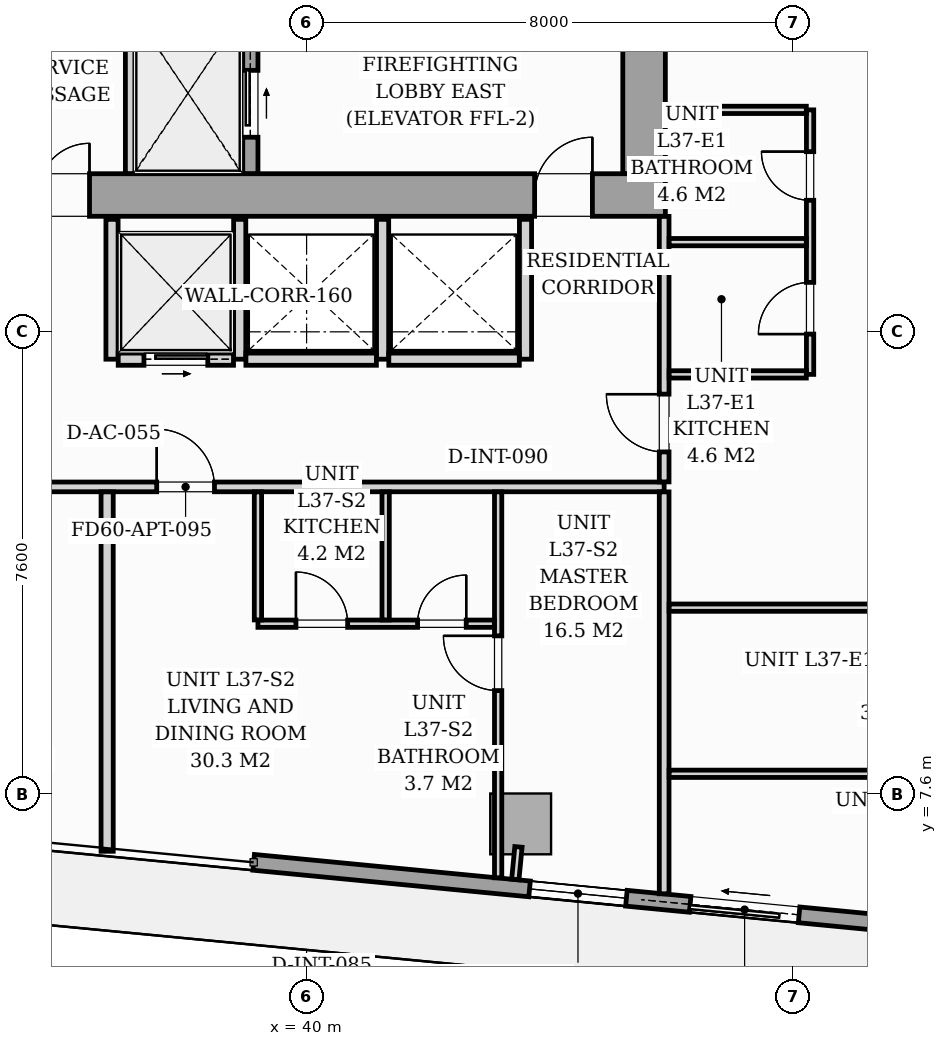
"""IFC4 building model, lengths in metres.
Left out: names, types, materials, properties, quantities, classifications, styles, units other than length and angle.
Written with IfcOpenShell. Run it as: python <this file> out.ifc"""

import sys

from ifc_helpers import new_model, si_unit, direction, frame, frame_2d, origin, origin_2d, place, context, subcontext, project, spatial, rectangle, i_section, extrude, source, transform, mapped, element, fill, save


model = new_model("IFC4")
c1 = context("Model", 3, precision=1e-05, world=origin(), true_north=direction((0.0, 1.0)))
c2 = subcontext(c1, "Body", "Model", "MODEL_VIEW")
j1 = project(units=[si_unit("LENGTHUNIT", "METRE"), si_unit("PLANEANGLEUNIT", "RADIAN")], contexts=[c1])
p1 = place(None, origin())
s1 = spatial("IfcSite", under=j1, at=p1, CompositionType="ELEMENT")
p2 = place(p1, origin())
s2 = spatial("IfcBuilding", under=s1, at=p2, CompositionType="ELEMENT")
p3 = place(p2, frame((0.0, 0.0, 131.0)))
s3 = spatial("IfcBuildingStorey", under=s2, at=p3, CompositionType="ELEMENT", Elevation=131.0)
m1 = source(origin(), c2, "Body", "SweptSolid", [
    extrude(i_section(OverallWidth=0.421, OverallDepth=0.465, WebThickness=0.045, FlangeThickness=0.073, FilletRadius=0.018, at=origin_2d()), origin(), (0.0, 0.0, 1.0), 3.196),
])
for number, where, z_axis, x_axis in (
    (1, (38.88, 17.4, 0.002), (0.0, 0.0, 1.0), (1.0, 0.0, 0.0)),
    (2, (45.6, 17.4, 0.002), (0.0, 0.0, 1.0), (1.0, 0.0, 0.0)),
):
    element("IfcColumn", number, at=place(p3, frame(where, z_axis=z_axis, x_axis=x_axis)), inside=s3, PredefinedType="PILASTER", context=c2, shape_type="MappedRepresentation", body=[
        mapped(m1, transform((0.0, 0.0, 0.0), scale=1.0)),
    ])
m2 = source(origin(), c2, "Body", "SweptSolid", [
    extrude(rectangle(XDim=1.0, YDim=1.0, at=origin_2d()), origin(), (0.0, 0.0, 1.0), 3.196),
])
p4 = place(p3, frame((43.521, 7.108, 0.002), z_axis=(0.0, 0.0, 1.0), x_axis=(0.995396198367, -0.09584575252, 0.0)))
e3 = element("IfcColumn", 3, at=p4, inside=s3, PredefinedType="COLUMN", context=c2, shape_type="MappedRepresentation", body=[
    mapped(m2, transform((0.0, 0.0, 0.0), scale=1.0)),
])
p5 = place(p3, frame((56.061, 4.845, 0.0), z_axis=(0.0, 0.0, 1.0), x_axis=(-0.995395976631, 0.095848055311, 0.0)))
e4 = element("IfcWall", 4, at=p5, inside=s3, PredefinedType="STANDARD", context=c2, shape_type="SweptSolid", body=[
    extrude(rectangle(XDim=17.01, YDim=0.26, at=frame_2d((8.505, 0.0))), origin(), (0.0, 0.0, 1.0), 2.94),
])
p6 = place(p5, frame((7.999, 0.0, 0.0)))
e5 = element("IfcOpeningElement", 5, at=p6, cuts=e4, PredefinedType="OPENING", context=c2, shape_type="SweptSolid", body=[
    extrude(rectangle(XDim=1.8, YDim=2.06, at=frame_2d((0.9, 1.03))), frame((0.0, 0.14, 0.0), z_axis=(0.0, -1.0, 0.0), x_axis=(1.0, 0.0, 0.0)), (0.0, 0.0, 1.0), 0.28),
])
p7 = place(p5, frame((2.05, 0.0, 0.65)))
e6 = element("IfcOpeningElement", 6, at=p7, cuts=e4, PredefinedType="OPENING", context=c2, shape_type="SweptSolid", body=[
    extrude(rectangle(XDim=1.6, YDim=1.5, at=frame_2d((0.8, 0.75))), frame((0.0, 0.14, 0.0), z_axis=(0.0, -1.0, 0.0), x_axis=(1.0, 0.0, 0.0)), (0.0, 0.0, 1.0), 0.28),
])
p8 = place(p5, frame((10.852, 0.0, 0.75)))
e7 = element("IfcOpeningElement", 7, at=p8, cuts=e4, PredefinedType="OPENING", context=c2, shape_type="SweptSolid", body=[
    extrude(rectangle(XDim=1.6, YDim=1.5, at=frame_2d((0.8, 0.75))), frame((0.0, 0.14, 0.0), z_axis=(0.0, -1.0, 0.0), x_axis=(1.0, 0.0, 0.0)), (0.0, 0.0, 1.0), 0.28),
])
p9 = place(p3, frame((26.1, 17.45, 0.0), z_axis=(0.0, 0.0, 1.0), x_axis=(1.0, 0.0, 0.0)))
e8 = element("IfcWall", 8, at=p9, inside=s3, PredefinedType="SHEAR", context=c2, shape_type="SweptSolid", body=[
    extrude(rectangle(XDim=19.8, YDim=0.7, at=frame_2d((9.9, 0.0))), origin(), (0.0, 0.0, 1.0), 3.2),
])
p10 = place(p9, frame((1.05, 0.0, 0.0)))
e9 = element("IfcOpeningElement", 9, at=p10, cuts=e8, PredefinedType="OPENING", context=c2, shape_type="SweptSolid", body=[
    extrude(rectangle(XDim=0.95, YDim=2.06, at=frame_2d((0.475, 1.03))), frame((0.0, 0.36, 0.0), z_axis=(0.0, -1.0, 0.0), x_axis=(1.0, 0.0, 0.0)), (0.0, 0.0, 1.0), 0.72),
])
p11 = place(p9, frame((9.48, 0.0, 0.0)))
e10 = element("IfcOpeningElement", 10, at=p11, cuts=e8, PredefinedType="OPENING", context=c2, shape_type="SweptSolid", body=[
    extrude(rectangle(XDim=0.85, YDim=2.0, at=frame_2d((0.425, 1.0))), frame((0.0, 0.36, 0.0), z_axis=(0.0, -1.0, 0.0), x_axis=(1.0, 0.0, 0.0)), (0.0, 0.0, 1.0), 0.72),
])
p12 = place(p9, frame((17.65, 0.0, 0.0)))
e11 = element("IfcOpeningElement", 11, at=p12, cuts=e8, PredefinedType="OPENING", context=c2, shape_type="SweptSolid", body=[
    extrude(rectangle(XDim=0.95, YDim=2.06, at=frame_2d((0.475, 1.03))), frame((0.0, 0.36, 0.0), z_axis=(0.0, -1.0, 0.0), x_axis=(1.0, 0.0, 0.0)), (0.0, 0.0, 1.0), 0.72),
])
p13 = place(p3, frame((45.55, 17.802, 0.0), z_axis=(0.0, 0.0, 1.0), x_axis=(0.0, 1.0, 0.0)))
e12 = element("IfcWall", 12, at=p13, inside=s3, PredefinedType="SHEAR", context=c2, shape_type="SweptSolid", body=[
    extrude(rectangle(XDim=5.796, YDim=0.7, at=frame_2d((2.898, 0.0))), origin(), (0.0, 0.0, 1.0), 3.2),
])
p14 = place(p3, frame((37.1, 17.802, 0.0), z_axis=(0.0, 0.0, 1.0), x_axis=(0.0, 1.0, 0.0)))
e13 = element("IfcWall", 13, at=p14, inside=s3, PredefinedType="PARTITIONING", context=c2, shape_type="SweptSolid", body=[
    extrude(rectangle(XDim=2.646, YDim=0.16, at=frame_2d((1.323, 0.0))), origin(), (0.0, 0.0, 1.0), 2.94),
])
p15 = place(p3, frame((39.075, 17.802, 0.0), z_axis=(0.0, 0.0, 1.0), x_axis=(0.0, 1.0, 0.0)))
e14 = element("IfcWall", 14, at=p15, inside=s3, PredefinedType="SOLIDWALL", context=c2, shape_type="SweptSolid", body=[
    extrude(rectangle(XDim=2.646, YDim=0.25, at=frame_2d((1.323, 0.0))), origin(), (0.0, 0.0, 1.0), 3.2),
])
p16 = place(p15, frame((0.598, 0.0, 0.0)))
e15 = element("IfcOpeningElement", 15, at=p16, cuts=e14, PredefinedType="OPENING", context=c2, shape_type="SweptSolid", body=[
    extrude(rectangle(XDim=1.1, YDim=2.08, at=frame_2d((0.55, 1.04))), frame((0.0, 0.135, 0.0), z_axis=(0.0, -1.0, 0.0), x_axis=(1.0, 0.0, 0.0)), (0.0, 0.0, 1.0), 0.27),
])
for number, where, z_axis, x_axis in (
    (16, (36.8, 14.75, 0.0), (0.0, 0.0, 1.0), (0.0, 1.0, 0.0)),
    (17, (38.9, 14.75, 0.0), (0.0, 0.0, 1.0), (0.0, 1.0, 0.0)),
):
    element("IfcWall", number, at=place(p3, frame(where, z_axis=z_axis, x_axis=x_axis)), inside=s3, PredefinedType="PARTITIONING", context=c2, shape_type="SweptSolid", body=[
        extrude(rectangle(XDim=2.3, YDim=0.2, at=frame_2d((1.15, 0.0))), origin(), (0.0, 0.0, 1.0), 2.94),
    ])
p17 = place(p3, frame((36.902, 14.75, 0.0), z_axis=(0.0, 0.0, 1.0), x_axis=(1.0, 0.0, 0.0)))
e18 = element("IfcWall", 18, at=p17, inside=s3, PredefinedType="PARTITIONING", context=c2, shape_type="SweptSolid", body=[
    extrude(rectangle(XDim=1.896, YDim=0.2, at=frame_2d((0.948, 0.0))), origin(), (0.0, 0.0, 1.0), 2.94),
])
p18 = place(p17, frame((0.423, 0.0, 0.0)))
e19 = element("IfcOpeningElement", 19, at=p18, cuts=e18, PredefinedType="OPENING", context=c2, shape_type="SweptSolid", body=[
    extrude(rectangle(XDim=1.05, YDim=2.08, at=frame_2d((0.525, 1.04))), frame((0.0, 0.11, 0.0), z_axis=(0.0, -1.0, 0.0), x_axis=(1.0, 0.0, 0.0)), (0.0, 0.0, 1.0), 0.22),
])
for number, where, z_axis, x_axis in (
    (20, (41.25, 14.75, 0.0), (0.0, 0.0, 1.0), (0.0, 1.0, 0.0)),
    (21, (43.6, 14.75, 0.0), (0.0, 0.0, 1.0), (0.0, 1.0, 0.0)),
):
    element("IfcWall", number, at=place(p3, frame(where, z_axis=z_axis, x_axis=x_axis)), inside=s3, PredefinedType="PARTITIONING", context=c2, shape_type="SweptSolid", body=[
        extrude(rectangle(XDim=2.3, YDim=0.2, at=frame_2d((1.15, 0.0))), origin(), (0.0, 0.0, 1.0), 2.94),
    ])
for number, where, z_axis, x_axis in (
    (22, (39.002, 14.75, 0.0), (0.0, 0.0, 1.0), (1.0, 0.0, 0.0)),
    (23, (41.352, 14.75, 0.0), (0.0, 0.0, 1.0), (1.0, 0.0, 0.0)),
):
    element("IfcWall", number, at=place(p3, frame(where, z_axis=z_axis, x_axis=x_axis)), inside=s3, PredefinedType="PARTITIONING", context=c2, shape_type="SweptSolid", body=[
        extrude(rectangle(XDim=2.146, YDim=0.2, at=frame_2d((1.073, 0.0))), origin(), (0.0, 0.0, 1.0), 2.94),
    ])
p19 = place(p3, frame((22.05, 12.65, 0.0), z_axis=(0.0, 0.0, 1.0), x_axis=(1.0, 0.0, 0.0)))
e24 = element("IfcWall", 24, at=p19, inside=s3, PredefinedType="PARTITIONING", context=c2, shape_type="SweptSolid", body=[
    extrude(rectangle(XDim=23.83, YDim=0.16, at=frame_2d((11.915, 0.0))), origin(), (0.0, 0.0, 1.0), 2.94),
])
p20 = place(p19, frame((3.0, 0.0, 0.0)))
e25 = element("IfcOpeningElement", 25, at=p20, cuts=e24, PredefinedType="OPENING", context=c2, shape_type="SweptSolid", body=[
    extrude(rectangle(XDim=0.95, YDim=2.06, at=frame_2d((0.475, 1.03))), frame((0.0, 0.09, 0.0), z_axis=(0.0, -1.0, 0.0), x_axis=(1.0, 0.0, 0.0)), (0.0, 0.0, 1.0), 0.18),
])
p21 = place(p19, frame((15.485, 0.0, 0.0)))
e26 = element("IfcOpeningElement", 26, at=p21, cuts=e24, PredefinedType="OPENING", context=c2, shape_type="SweptSolid", body=[
    extrude(rectangle(XDim=0.95, YDim=2.06, at=frame_2d((0.475, 1.03))), frame((0.0, 0.09, 0.0), z_axis=(0.0, -1.0, 0.0), x_axis=(1.0, 0.0, 0.0)), (0.0, 0.0, 1.0), 0.18),
])
p22 = place(p3, frame((45.88, 5.958, 0.0), z_axis=(0.0, 0.0, 1.0), x_axis=(0.0, 1.0, 0.0)))
e27 = element("IfcWall", 27, at=p22, inside=s3, PredefinedType="PARTITIONING", context=c2, shape_type="SweptSolid", body=[
    extrude(rectangle(XDim=6.61, YDim=0.16, at=frame_2d((3.305, 0.0))), origin(), (0.0, 0.0, 1.0), 2.94),
])
p23 = place(p3, frame((45.88, 12.732, 0.0), z_axis=(0.0, 0.0, 1.0), x_axis=(0.0, 1.0, 0.0)))
e28 = element("IfcWall", 28, at=p23, inside=s3, PredefinedType="PARTITIONING", context=c2, shape_type="SweptSolid", body=[
    extrude(rectangle(XDim=4.366, YDim=0.16, at=frame_2d((2.183, 0.0))), origin(), (0.0, 0.0, 1.0), 2.94),
])
p24 = place(p23, frame((0.493, 0.0, 0.0)))
e29 = element("IfcOpeningElement", 29, at=p24, cuts=e28, PredefinedType="OPENING", context=c2, shape_type="SweptSolid", body=[
    extrude(rectangle(XDim=0.95, YDim=2.06, at=frame_2d((0.475, 1.03))), frame((0.0, 0.09, 0.0), z_axis=(0.0, -1.0, 0.0), x_axis=(1.0, 0.0, 0.0)), (0.0, 0.0, 1.0), 0.18),
])
p25 = place(p3, frame((36.72, 6.658, 0.0), z_axis=(0.0, 0.0, 1.0), x_axis=(0.0, 1.0, 0.0)))
e30 = element("IfcWall", 30, at=p25, inside=s3, PredefinedType="PARTITIONING", context=c2, shape_type="SweptSolid", body=[
    extrude(rectangle(XDim=5.91, YDim=0.2, at=frame_2d((2.955, 0.0))), origin(), (0.0, 0.0, 1.0), 2.94),
])
p26 = place(p3, frame((43.15, 6.221, 0.0), z_axis=(0.0, 0.0, 1.0), x_axis=(0.0, 1.0, 0.0)))
e31 = element("IfcWall", 31, at=p26, inside=s3, PredefinedType="PARTITIONING", context=c2, shape_type="SweptSolid", body=[
    extrude(rectangle(XDim=6.347, YDim=0.12, at=frame_2d((3.173, 0.0))), origin(), (0.0, 0.0, 1.0), 2.94),
])
p27 = place(p26, frame((3.079, 0.0, 0.0)))
e32 = element("IfcOpeningElement", 32, at=p27, cuts=e31, PredefinedType="OPENING", context=c2, shape_type="SweptSolid", body=[
    extrude(rectangle(XDim=0.9, YDim=2.05, at=frame_2d((0.45, 1.025))), frame((0.0, 0.07, 0.0), z_axis=(0.0, -1.0, 0.0), x_axis=(1.0, 0.0, 0.0)), (0.0, 0.0, 1.0), 0.14),
])
p28 = place(p3, frame((39.2, 10.4, 0.0), z_axis=(0.0, 0.0, 1.0), x_axis=(1.0, 0.0, 0.0)))
e33 = element("IfcWall", 33, at=p28, inside=s3, PredefinedType="PARTITIONING", context=c2, shape_type="SweptSolid", body=[
    extrude(rectangle(XDim=3.888, YDim=0.12, at=frame_2d((1.944, 0.0))), origin(), (0.0, 0.0, 1.0), 2.94),
])
p29 = place(p28, frame((0.625, 0.0, 0.0)))
e34 = element("IfcOpeningElement", 34, at=p29, cuts=e33, PredefinedType="OPENING", context=c2, shape_type="SweptSolid", body=[
    extrude(rectangle(XDim=0.85, YDim=2.05, at=frame_2d((0.425, 1.025))), frame((0.0, 0.07, 0.0), z_axis=(0.0, -1.0, 0.0), x_axis=(1.0, 0.0, 0.0)), (0.0, 0.0, 1.0), 0.14),
])
p30 = place(p28, frame((2.625, 0.0, 0.0)))
e35 = element("IfcOpeningElement", 35, at=p30, cuts=e33, PredefinedType="OPENING", context=c2, shape_type="SweptSolid", body=[
    extrude(rectangle(XDim=0.8, YDim=2.02, at=frame_2d((0.4, 1.01))), frame((0.0, 0.07, 0.0), z_axis=(0.0, -1.0, 0.0), x_axis=(1.0, 0.0, 0.0)), (0.0, 0.0, 1.0), 0.14),
])
for number, where, z_axis, x_axis in (
    (36, (41.3, 10.462, 0.0), (0.0, 0.0, 1.0), (0.0, 1.0, 0.0)),
    (37, (39.2, 10.462, 0.0), (0.0, 0.0, 1.0), (0.0, 1.0, 0.0)),
):
    element("IfcWall", number, at=place(p3, frame(where, z_axis=z_axis, x_axis=x_axis)), inside=s3, PredefinedType="PARTITIONING", context=c2, shape_type="SweptSolid", body=[
        extrude(rectangle(XDim=2.106, YDim=0.12, at=frame_2d((1.053, 0.0))), origin(), (0.0, 0.0, 1.0), 2.94),
    ])
p31 = place(p3, frame((48.28, 14.5, 0.0), z_axis=(0.0, 0.0, 1.0), x_axis=(0.0, 1.0, 0.0)))
e38 = element("IfcWall", 38, at=p31, inside=s3, PredefinedType="PARTITIONING", context=c2, shape_type="SweptSolid", body=[
    extrude(rectangle(XDim=4.35, YDim=0.12, at=frame_2d((2.175, 0.0))), origin(), (0.0, 0.0, 1.0), 2.94),
])
p32 = place(p31, frame((0.663, 0.0, 0.0)))
e39 = element("IfcOpeningElement", 39, at=p32, cuts=e38, PredefinedType="OPENING", context=c2, shape_type="SweptSolid", body=[
    extrude(rectangle(XDim=0.85, YDim=2.05, at=frame_2d((0.425, 1.025))), frame((0.0, 0.07, 0.0), z_axis=(0.0, -1.0, 0.0), x_axis=(1.0, 0.0, 0.0)), (0.0, 0.0, 1.0), 0.14),
])
p33 = place(p31, frame((2.863, 0.0, 0.0)))
e40 = element("IfcOpeningElement", 40, at=p33, cuts=e38, PredefinedType="OPENING", context=c2, shape_type="SweptSolid", body=[
    extrude(rectangle(XDim=0.8, YDim=2.02, at=frame_2d((0.4, 1.01))), frame((0.0, 0.07, 0.0), z_axis=(0.0, -1.0, 0.0), x_axis=(1.0, 0.0, 0.0)), (0.0, 0.0, 1.0), 0.14),
])
p34 = place(p3, frame((45.962, 16.675, 0.0), z_axis=(0.0, 0.0, 1.0), x_axis=(1.0, 0.0, 0.0)))
e41 = element("IfcWall", 41, at=p34, inside=s3, PredefinedType="PARTITIONING", context=c2, shape_type="SweptSolid", body=[
    extrude(rectangle(XDim=2.256, YDim=0.12, at=frame_2d((1.128, 0.0))), origin(), (0.0, 0.0, 1.0), 2.063),
])
p35 = place(p3, frame((45.962, 14.5, 0.0), z_axis=(0.0, 0.0, 1.0), x_axis=(1.0, 0.0, 0.0)))
e42 = element("IfcWall", 42, at=p35, inside=s3, PredefinedType="PARTITIONING", context=c2, shape_type="SweptSolid", body=[
    extrude(rectangle(XDim=2.256, YDim=0.12, at=frame_2d((1.128, 0.0))), origin(), (0.0, 0.0, 1.0), 2.94),
])
p36 = place(p3, frame((45.902, 18.85, 0.0), z_axis=(0.0, 0.0, 1.0), x_axis=(1.0, 0.0, 0.0)))
e43 = element("IfcWall", 43, at=p36, inside=s3, PredefinedType="PARTITIONING", context=c2, shape_type="SweptSolid", body=[
    extrude(rectangle(XDim=2.316, YDim=0.12, at=frame_2d((1.158, 0.0))), origin(), (0.0, 0.0, 1.0), 2.94),
])
p37 = place(p3, frame((45.962, 7.932, 0.0), z_axis=(0.0, 0.0, 1.0), x_axis=(1.0, 0.0, 0.0)))
e44 = element("IfcWall", 44, at=p37, inside=s3, PredefinedType="PARTITIONING", context=c2, shape_type="SweptSolid", body=[
    extrude(rectangle(XDim=12.828, YDim=0.12, at=frame_2d((6.414, 0.0))), origin(), (0.0, 0.0, 1.0), 2.94),
])
p38 = place(p37, frame((5.995, 0.0, 0.0)))
e45 = element("IfcOpeningElement", 45, at=p38, cuts=e44, PredefinedType="OPENING", context=c2, shape_type="SweptSolid", body=[
    extrude(rectangle(XDim=0.85, YDim=2.05, at=frame_2d((0.425, 1.025))), frame((0.0, 0.07, 0.0), z_axis=(0.0, -1.0, 0.0), x_axis=(1.0, 0.0, 0.0)), (0.0, 0.0, 1.0), 0.14),
])
p39 = place(p3, frame((45.962, 10.664, 0.0), z_axis=(0.0, 0.0, 1.0), x_axis=(1.0, 0.0, 0.0)))
e46 = element("IfcWall", 46, at=p39, inside=s3, PredefinedType="PARTITIONING", context=c2, shape_type="SweptSolid", body=[
    extrude(rectangle(XDim=13.091, YDim=0.12, at=frame_2d((6.545, 0.0))), origin(), (0.0, 0.0, 1.0), 2.94),
])
p40 = place(p39, frame((6.127, 0.0, 0.0)))
e47 = element("IfcOpeningElement", 47, at=p40, cuts=e46, PredefinedType="OPENING", context=c2, shape_type="SweptSolid", body=[
    extrude(rectangle(XDim=0.85, YDim=2.05, at=frame_2d((0.425, 1.025))), frame((0.0, 0.07, 0.0), z_axis=(0.0, -1.0, 0.0), x_axis=(1.0, 0.0, 0.0)), (0.0, 0.0, 1.0), 0.14),
])
p41 = place(p3, frame((43.484, 6.729, 0.0), z_axis=(0.0, 0.0, 1.0), x_axis=(-0.095772948675, -0.995403205893, 0.0)))
e48 = element("IfcWall", 48, at=p41, inside=s3, PredefinedType="PARTITIONING", context=c2, shape_type="SweptSolid", body=[
    extrude(rectangle(XDim=0.538, YDim=0.12, at=frame_2d((0.269, 0.0))), origin(), (0.0, 0.0, 1.0), 2.94),
])
m3 = source(origin(), c2, "Body", "SweptSolid", [
    extrude(rectangle(XDim=1.8, YDim=2.06, at=frame_2d((0.9, 1.03))), frame((0.0, 0.025, 0.0), z_axis=(0.0, -1.0, 0.0), x_axis=(1.0, 0.0, 0.0)), (0.0, 0.0, 1.0), 0.05),
])
p42 = place(p6, origin())
e49 = element("IfcDoor", 49, at=p42, inside=s3, OperationType="SLIDING_TO_RIGHT", PredefinedType="DOOR", context=c2, shape_type="MappedRepresentation", body=[
    mapped(m3, transform((0.0, 0.0, 0.0), scale=1.0)),
])
fill(e5, e49)
m4 = source(origin(), c2, "Body", "SweptSolid", [
    extrude(rectangle(XDim=1.6, YDim=1.5, at=frame_2d((0.8, 0.75))), frame((0.0, 0.03, 0.0), z_axis=(0.0, -1.0, 0.0), x_axis=(1.0, 0.0, 0.0)), (0.0, 0.0, 1.0), 0.06),
])
p43 = place(p8, origin())
e50 = element("IfcWindow", 50, at=p43, inside=s3, PartitioningType="SINGLE_PANEL", PredefinedType="WINDOW", context=c2, shape_type="MappedRepresentation", body=[
    mapped(m4, transform((0.0, 0.0, 0.0), scale=1.0)),
])
fill(e7, e50)
m5 = source(origin(), c2, "Body", "SweptSolid", [
    extrude(rectangle(XDim=0.85, YDim=2.0, at=frame_2d((0.425, 1.0))), frame((0.0, 0.025, 0.0), z_axis=(0.0, -1.0, 0.0), x_axis=(1.0, 0.0, 0.0)), (0.0, 0.0, 1.0), 0.05),
])
p44 = place(p11, origin())
e51 = element("IfcDoor", 51, at=p44, inside=s3, OperationType="SINGLE_SWING_RIGHT", PredefinedType="DOOR", context=c2, shape_type="MappedRepresentation", body=[
    mapped(m5, transform((0.0, 0.0, 0.0), scale=1.0)),
])
fill(e10, e51)
m6 = source(origin(), c2, "Body", "SweptSolid", [
    extrude(rectangle(XDim=0.95, YDim=2.06, at=frame_2d((0.475, 1.03))), frame((0.0, 0.025, 0.0), z_axis=(0.0, -1.0, 0.0), x_axis=(1.0, 0.0, 0.0)), (0.0, 0.0, 1.0), 0.05),
])
p45 = place(p12, origin())
e52 = element("IfcDoor", 52, at=p45, inside=s3, OperationType="SINGLE_SWING_RIGHT", PredefinedType="DOOR", context=c2, shape_type="MappedRepresentation", body=[
    mapped(m6, transform((0.0, 0.0, 0.0), scale=1.0)),
])
fill(e11, e52)
m7 = source(origin(), c2, "Body", "SweptSolid", [
    extrude(rectangle(XDim=1.1, YDim=2.08, at=frame_2d((0.55, 1.04))), frame((0.0, 0.025, 0.0), z_axis=(0.0, -1.0, 0.0), x_axis=(1.0, 0.0, 0.0)), (0.0, 0.0, 1.0), 0.05),
])
p46 = place(p16, origin())
e53 = element("IfcDoor", 53, at=p46, inside=s3, OperationType="SLIDING_TO_RIGHT", PredefinedType="DOOR", context=c2, shape_type="MappedRepresentation", body=[
    mapped(m7, transform((0.0, 0.0, 0.0), scale=1.0)),
])
fill(e15, e53)
m8 = source(origin(), c2, "Body", "SweptSolid", [
    extrude(rectangle(XDim=1.05, YDim=2.08, at=frame_2d((0.525, 1.04))), frame((0.0, 0.025, 0.0), z_axis=(0.0, -1.0, 0.0), x_axis=(1.0, 0.0, 0.0)), (0.0, 0.0, 1.0), 0.05),
])
p47 = place(p18, origin())
e54 = element("IfcDoor", 54, at=p47, inside=s3, OperationType="SLIDING_TO_RIGHT", PredefinedType="DOOR", context=c2, shape_type="MappedRepresentation", body=[
    mapped(m8, transform((0.0, 0.0, 0.0), scale=1.0)),
])
fill(e19, e54)
m9 = source(origin(), c2, "Body", "SweptSolid", [
    extrude(rectangle(XDim=0.95, YDim=2.06, at=frame_2d((0.475, 1.03))), frame((0.0, 0.025, 0.0), z_axis=(0.0, -1.0, 0.0), x_axis=(1.0, 0.0, 0.0)), (0.0, 0.0, 1.0), 0.05),
])
p48 = place(p21, origin())
e55 = element("IfcDoor", 55, at=p48, inside=s3, OperationType="SINGLE_SWING_LEFT", PredefinedType="DOOR", context=c2, shape_type="MappedRepresentation", body=[
    mapped(m9, transform((0.0, 0.0, 0.0), scale=1.0)),
])
fill(e26, e55)
m10 = source(origin(), c2, "Body", "SweptSolid", [
    extrude(rectangle(XDim=0.9, YDim=2.05, at=frame_2d((0.45, 1.025))), frame((0.0, 0.025, 0.0), z_axis=(0.0, -1.0, 0.0), x_axis=(1.0, 0.0, 0.0)), (0.0, 0.0, 1.0), 0.05),
])
p49 = place(p27, origin())
e56 = element("IfcDoor", 56, at=p49, inside=s3, OperationType="SINGLE_SWING_RIGHT", PredefinedType="DOOR", context=c2, shape_type="MappedRepresentation", body=[
    mapped(m10, transform((0.0, 0.0, 0.0), scale=1.0)),
])
fill(e32, e56)
m11 = source(origin(), c2, "Body", "SweptSolid", [
    extrude(rectangle(XDim=0.85, YDim=2.05, at=frame_2d((0.425, 1.025))), frame((0.0, 0.025, 0.0), z_axis=(0.0, -1.0, 0.0), x_axis=(1.0, 0.0, 0.0)), (0.0, 0.0, 1.0), 0.05),
])
p50 = place(p29, origin())
e57 = element("IfcDoor", 57, at=p50, inside=s3, OperationType="SINGLE_SWING_LEFT", PredefinedType="DOOR", context=c2, shape_type="MappedRepresentation", body=[
    mapped(m11, transform((0.0, 0.0, 0.0), scale=1.0)),
])
fill(e34, e57)
m12 = source(origin(), c2, "Body", "SweptSolid", [
    extrude(rectangle(XDim=0.8, YDim=2.02, at=frame_2d((0.4, 1.01))), frame((0.0, 0.025, 0.0), z_axis=(0.0, -1.0, 0.0), x_axis=(1.0, 0.0, 0.0)), (0.0, 0.0, 1.0), 0.05),
])
p51 = place(p30, origin())
e58 = element("IfcDoor", 58, at=p51, inside=s3, OperationType="SINGLE_SWING_RIGHT", PredefinedType="DOOR", context=c2, shape_type="MappedRepresentation", body=[
    mapped(m12, transform((0.0, 0.0, 0.0), scale=1.0)),
])
fill(e35, e58)
p52 = place(p24, origin())
e59 = element("IfcDoor", 59, at=p52, inside=s3, OperationType="SINGLE_SWING_RIGHT", PredefinedType="DOOR", context=c2, shape_type="MappedRepresentation", body=[
    mapped(m9, transform((0.0, 0.0, 0.0), scale=1.0)),
])
fill(e29, e59)
p53 = place(p32, origin())
e60 = element("IfcDoor", 60, at=p53, inside=s3, OperationType="SINGLE_SWING_LEFT", PredefinedType="DOOR", context=c2, shape_type="MappedRepresentation", body=[
    mapped(m11, transform((0.0, 0.0, 0.0), scale=1.0)),
])
fill(e39, e60)
p54 = place(p33, origin())
e61 = element("IfcDoor", 61, at=p54, inside=s3, OperationType="SINGLE_SWING_RIGHT", PredefinedType="DOOR", context=c2, shape_type="MappedRepresentation", body=[
    mapped(m12, transform((0.0, 0.0, 0.0), scale=1.0)),
])
fill(e40, e61)
save(model, sys.argv[1])
